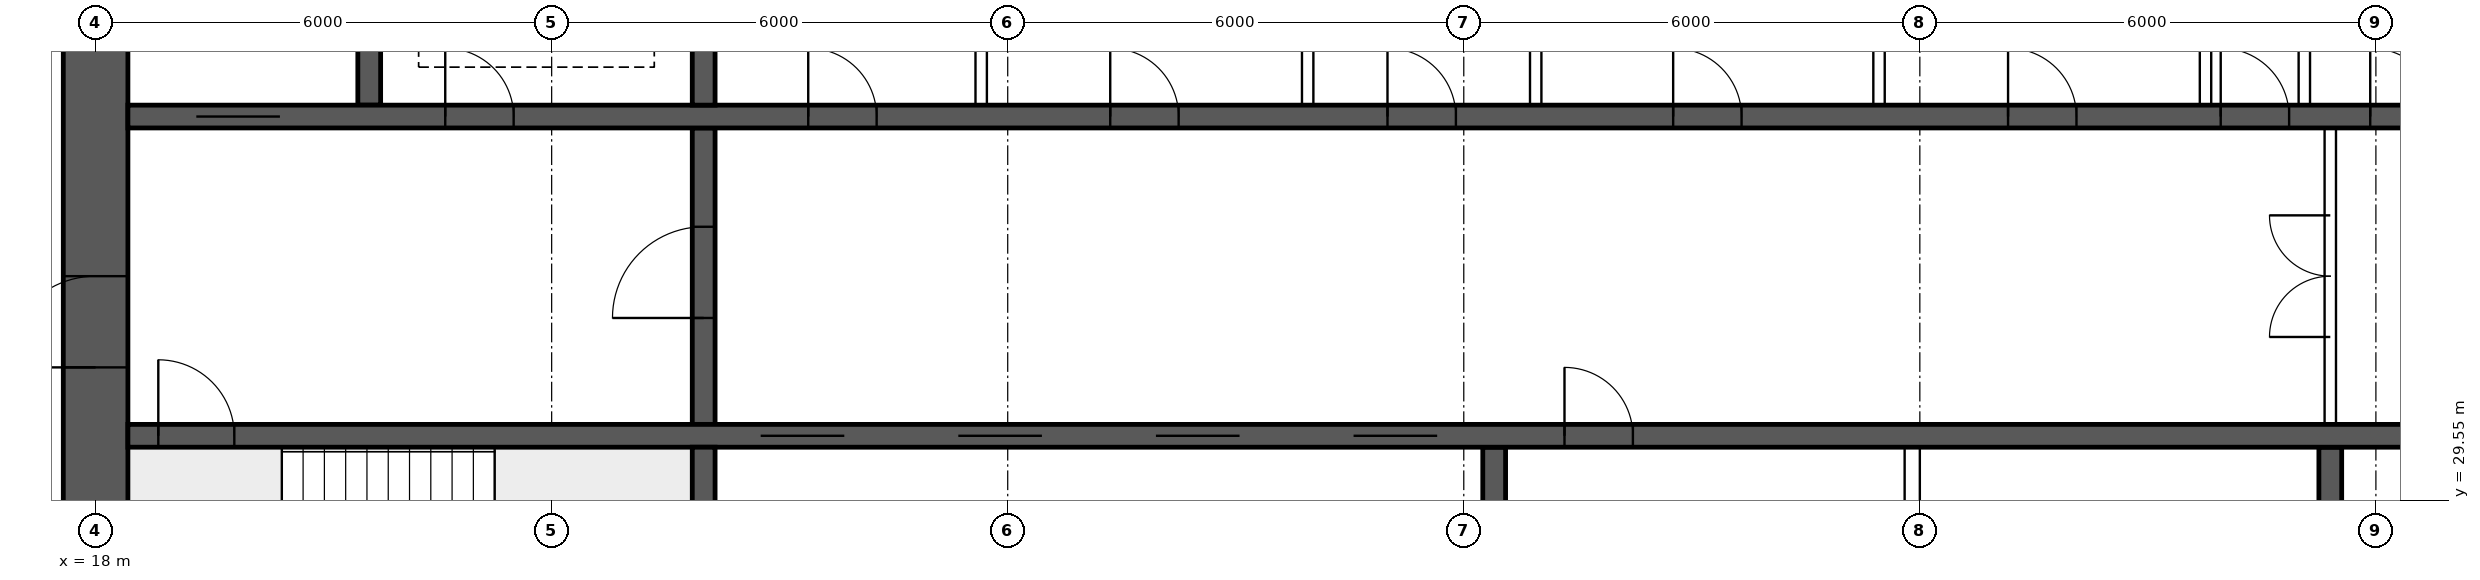
"""IFC4 building model, lengths in metres.
Left out: names, types, materials, properties, quantities, classifications, styles, units other than length and angle.
Written with IfcOpenShell. Run it as: python <this file> out.ifc"""

import sys

from ifc_helpers import new_model, si_unit, direction, frame, frame_2d, origin, place, context, subcontext, project, spatial, rectangle, extrude, element, fill, save


model = new_model("IFC4")
c1 = context("Model", 3, precision=1e-05, world=origin(), true_north=direction((0.0, 1.0)))
c2 = subcontext(c1, "Body", "Model", "MODEL_VIEW")
j1 = project(units=[si_unit("LENGTHUNIT", "METRE"), si_unit("PLANEANGLEUNIT", "RADIAN")], contexts=[c1])
p1 = place(None, origin())
s1 = spatial("IfcSite", under=j1, at=p1, CompositionType="ELEMENT")
p2 = place(p1, origin())
s2 = spatial("IfcBuilding", under=s1, at=p2, CompositionType="ELEMENT")
p3 = place(p2, frame((0.0, 0.0, 171.1)))
s3 = spatial("IfcBuildingStorey", under=s2, at=p3, CompositionType="ELEMENT", Elevation=171.1)
p4 = place(p3, frame((18.0, 26.225, 0.0), z_axis=(0.0, 0.0, 1.0), x_axis=(0.0, 1.0, 0.0)))
e1 = element("IfcWall", 1, at=p4, inside=s3, PredefinedType="SHEAR", context=c2, shape_type="SweptSolid", body=[
    extrude(rectangle(XDim=11.55, YDim=0.85, at=frame_2d((5.775, 0.0))), origin(), (0.0, 0.0, 1.0), 3.75),
])
p5 = place(p4, frame((5.075, 0.0, 0.0)))
e2 = element("IfcOpeningElement", 2, at=p5, cuts=e1, PredefinedType="OPENING", context=c2, shape_type="SweptSolid", body=[
    extrude(rectangle(XDim=1.2, YDim=2.1, at=frame_2d((0.6, 1.05))), frame((0.0, 0.435, 0.0), z_axis=(0.0, -1.0, 0.0), x_axis=(1.0, 0.0, 0.0)), (0.0, 0.0, 1.0), 0.87),
])
p6 = place(p3, frame((18.425, 30.4, 0.0), z_axis=(0.0, 0.0, 1.0), x_axis=(1.0, 0.0, 0.0)))
e3 = element("IfcWall", 3, at=p6, inside=s3, PredefinedType="SHEAR", context=c2, shape_type="SweptSolid", body=[
    extrude(rectangle(XDim=47.15, YDim=0.3, at=frame_2d((23.575, 0.0))), origin(), (0.0, 0.0, 1.0), 3.75),
])
p7 = place(p6, frame((0.4, 0.0, 0.0)))
e4 = element("IfcOpeningElement", 4, at=p7, cuts=e3, PredefinedType="OPENING", context=c2, shape_type="SweptSolid", body=[
    extrude(rectangle(XDim=1.0, YDim=2.1, at=frame_2d((0.5, 1.05))), frame((0.0, 0.16, 0.0), z_axis=(0.0, -1.0, 0.0), x_axis=(1.0, 0.0, 0.0)), (0.0, 0.0, 1.0), 0.32),
])
p8 = place(p6, frame((45.75, 0.0, 0.0)))
e5 = element("IfcOpeningElement", 5, at=p8, cuts=e3, PredefinedType="OPENING", context=c2, shape_type="SweptSolid", body=[
    extrude(rectangle(XDim=1.0, YDim=2.1, at=frame_2d((0.5, 1.05))), frame((0.0, 0.16, 0.0), z_axis=(0.0, -1.0, 0.0), x_axis=(1.0, 0.0, 0.0)), (0.0, 0.0, 1.0), 0.32),
])
p9 = place(p6, frame((8.325, 0.0, 0.0)))
e6 = element("IfcOpeningElement", 6, at=p9, cuts=e3, PredefinedType="OPENING", context=c2, shape_type="SweptSolid", body=[
    extrude(rectangle(XDim=1.1, YDim=2.1, at=frame_2d((0.55, 1.05))), frame((0.0, 0.16, 0.0), z_axis=(0.0, -1.0, 0.0), x_axis=(1.0, 0.0, 0.0)), (0.0, 0.0, 1.0), 0.32),
])
p10 = place(p6, frame((10.925, 0.0, 0.0)))
e7 = element("IfcOpeningElement", 7, at=p10, cuts=e3, PredefinedType="OPENING", context=c2, shape_type="SweptSolid", body=[
    extrude(rectangle(XDim=1.1, YDim=2.1, at=frame_2d((0.55, 1.05))), frame((0.0, 0.16, 0.0), z_axis=(0.0, -1.0, 0.0), x_axis=(1.0, 0.0, 0.0)), (0.0, 0.0, 1.0), 0.32),
])
p11 = place(p6, frame((13.525, 0.0, 0.0)))
e8 = element("IfcOpeningElement", 8, at=p11, cuts=e3, PredefinedType="OPENING", context=c2, shape_type="SweptSolid", body=[
    extrude(rectangle(XDim=1.1, YDim=2.1, at=frame_2d((0.55, 1.05))), frame((0.0, 0.16, 0.0), z_axis=(0.0, -1.0, 0.0), x_axis=(1.0, 0.0, 0.0)), (0.0, 0.0, 1.0), 0.32),
])
p12 = place(p6, frame((16.125, 0.0, 0.0)))
e9 = element("IfcOpeningElement", 9, at=p12, cuts=e3, PredefinedType="OPENING", context=c2, shape_type="SweptSolid", body=[
    extrude(rectangle(XDim=1.1, YDim=2.1, at=frame_2d((0.55, 1.05))), frame((0.0, 0.16, 0.0), z_axis=(0.0, -1.0, 0.0), x_axis=(1.0, 0.0, 0.0)), (0.0, 0.0, 1.0), 0.32),
])
p13 = place(p6, frame((18.9, 0.0, 0.0)))
e10 = element("IfcOpeningElement", 10, at=p13, cuts=e3, PredefinedType="OPENING", context=c2, shape_type="SweptSolid", body=[
    extrude(rectangle(XDim=0.9, YDim=2.1, at=frame_2d((0.45, 1.05))), frame((0.0, 0.16, 0.0), z_axis=(0.0, -1.0, 0.0), x_axis=(1.0, 0.0, 0.0)), (0.0, 0.0, 1.0), 0.32),
])
p14 = place(p6, frame((30.192, 0.0, 0.0)))
e11 = element("IfcOpeningElement", 11, at=p14, cuts=e3, PredefinedType="OPENING", context=c2, shape_type="SweptSolid", body=[
    extrude(rectangle(XDim=1.1, YDim=2.1, at=frame_2d((0.55, 1.05))), frame((0.0, 0.16, 0.0), z_axis=(0.0, -1.0, 0.0), x_axis=(1.0, 0.0, 0.0)), (0.0, 0.0, 1.0), 0.32),
])
p15 = place(p6, frame((33.725, 0.0, 0.0)))
e12 = element("IfcOpeningElement", 12, at=p15, cuts=e3, PredefinedType="OPENING", context=c2, shape_type="SweptSolid", body=[
    extrude(rectangle(XDim=1.1, YDim=2.1, at=frame_2d((0.55, 1.05))), frame((0.0, 0.16, 0.0), z_axis=(0.0, -1.0, 0.0), x_axis=(1.0, 0.0, 0.0)), (0.0, 0.0, 1.0), 0.32),
])
p16 = place(p6, frame((37.258, 0.0, 0.0)))
e13 = element("IfcOpeningElement", 13, at=p16, cuts=e3, PredefinedType="OPENING", context=c2, shape_type="SweptSolid", body=[
    extrude(rectangle(XDim=1.1, YDim=2.1, at=frame_2d((0.55, 1.05))), frame((0.0, 0.16, 0.0), z_axis=(0.0, -1.0, 0.0), x_axis=(1.0, 0.0, 0.0)), (0.0, 0.0, 1.0), 0.32),
])
p17 = place(p3, frame((18.425, 34.6, 0.0), z_axis=(0.0, 0.0, 1.0), x_axis=(1.0, 0.0, 0.0)))
e14 = element("IfcWall", 14, at=p17, inside=s3, PredefinedType="SHEAR", context=c2, shape_type="SweptSolid", body=[
    extrude(rectangle(XDim=47.15, YDim=0.3, at=frame_2d((23.575, 0.0))), origin(), (0.0, 0.0, 1.0), 3.75),
])
p18 = place(p17, frame((0.9, 0.0, 0.0)))
e15 = element("IfcOpeningElement", 15, at=p18, cuts=e14, PredefinedType="OPENING", context=c2, shape_type="SweptSolid", body=[
    extrude(rectangle(XDim=1.1, YDim=2.1, at=frame_2d((0.55, 1.05))), frame((0.0, 0.16, 0.0), z_axis=(0.0, -1.0, 0.0), x_axis=(1.0, 0.0, 0.0)), (0.0, 0.0, 1.0), 0.32),
])
p19 = place(p17, frame((45.15, 0.0, 0.0)))
e16 = element("IfcOpeningElement", 16, at=p19, cuts=e14, PredefinedType="OPENING", context=c2, shape_type="SweptSolid", body=[
    extrude(rectangle(XDim=1.1, YDim=2.1, at=frame_2d((0.55, 1.05))), frame((0.0, 0.16, 0.0), z_axis=(0.0, -1.0, 0.0), x_axis=(1.0, 0.0, 0.0)), (0.0, 0.0, 1.0), 0.32),
])
p20 = place(p17, frame((4.175, 0.0, 0.0)))
e17 = element("IfcOpeningElement", 17, at=p20, cuts=e14, PredefinedType="OPENING", context=c2, shape_type="SweptSolid", body=[
    extrude(rectangle(XDim=0.9, YDim=2.1, at=frame_2d((0.45, 1.05))), frame((0.0, 0.16, 0.0), z_axis=(0.0, -1.0, 0.0), x_axis=(1.0, 0.0, 0.0)), (0.0, 0.0, 1.0), 0.32),
])
p21 = place(p17, frame((42.075, 0.0, 0.0)))
e18 = element("IfcOpeningElement", 18, at=p21, cuts=e14, PredefinedType="OPENING", context=c2, shape_type="SweptSolid", body=[
    extrude(rectangle(XDim=0.9, YDim=2.1, at=frame_2d((0.45, 1.05))), frame((0.0, 0.16, 0.0), z_axis=(0.0, -1.0, 0.0), x_axis=(1.0, 0.0, 0.0)), (0.0, 0.0, 1.0), 0.32),
])
p22 = place(p17, frame((8.95, 0.0, 0.0)))
e19 = element("IfcOpeningElement", 19, at=p22, cuts=e14, PredefinedType="OPENING", context=c2, shape_type="SweptSolid", body=[
    extrude(rectangle(XDim=0.9, YDim=2.1, at=frame_2d((0.45, 1.05))), frame((0.0, 0.16, 0.0), z_axis=(0.0, -1.0, 0.0), x_axis=(1.0, 0.0, 0.0)), (0.0, 0.0, 1.0), 0.32),
])
p23 = place(p17, frame((12.924, 0.0, 0.0)))
e20 = element("IfcOpeningElement", 20, at=p23, cuts=e14, PredefinedType="OPENING", context=c2, shape_type="SweptSolid", body=[
    extrude(rectangle(XDim=0.9, YDim=2.1, at=frame_2d((0.45, 1.05))), frame((0.0, 0.16, 0.0), z_axis=(0.0, -1.0, 0.0), x_axis=(1.0, 0.0, 0.0)), (0.0, 0.0, 1.0), 0.32),
])
p24 = place(p17, frame((16.571, 0.0, 0.0)))
e21 = element("IfcOpeningElement", 21, at=p24, cuts=e14, PredefinedType="OPENING", context=c2, shape_type="SweptSolid", body=[
    extrude(rectangle(XDim=0.9, YDim=2.1, at=frame_2d((0.45, 1.05))), frame((0.0, 0.16, 0.0), z_axis=(0.0, -1.0, 0.0), x_axis=(1.0, 0.0, 0.0)), (0.0, 0.0, 1.0), 0.32),
])
p25 = place(p17, frame((20.33, 0.0, 0.0)))
e22 = element("IfcOpeningElement", 22, at=p25, cuts=e14, PredefinedType="OPENING", context=c2, shape_type="SweptSolid", body=[
    extrude(rectangle(XDim=0.9, YDim=2.1, at=frame_2d((0.45, 1.05))), frame((0.0, 0.16, 0.0), z_axis=(0.0, -1.0, 0.0), x_axis=(1.0, 0.0, 0.0)), (0.0, 0.0, 1.0), 0.32),
])
p26 = place(p17, frame((24.736, 0.0, 0.0)))
e23 = element("IfcOpeningElement", 23, at=p26, cuts=e14, PredefinedType="OPENING", context=c2, shape_type="SweptSolid", body=[
    extrude(rectangle(XDim=0.9, YDim=2.1, at=frame_2d((0.45, 1.05))), frame((0.0, 0.16, 0.0), z_axis=(0.0, -1.0, 0.0), x_axis=(1.0, 0.0, 0.0)), (0.0, 0.0, 1.0), 0.32),
])
p27 = place(p17, frame((27.533, 0.0, 0.0)))
e24 = element("IfcOpeningElement", 24, at=p27, cuts=e14, PredefinedType="OPENING", context=c2, shape_type="SweptSolid", body=[
    extrude(rectangle(XDim=0.9, YDim=2.1, at=frame_2d((0.45, 1.05))), frame((0.0, 0.16, 0.0), z_axis=(0.0, -1.0, 0.0), x_axis=(1.0, 0.0, 0.0)), (0.0, 0.0, 1.0), 0.32),
])
p28 = place(p17, frame((29.5, 0.0, 0.0)))
e25 = element("IfcOpeningElement", 25, at=p28, cuts=e14, PredefinedType="OPENING", context=c2, shape_type="SweptSolid", body=[
    extrude(rectangle(XDim=0.9, YDim=2.1, at=frame_2d((0.45, 1.05))), frame((0.0, 0.16, 0.0), z_axis=(0.0, -1.0, 0.0), x_axis=(1.0, 0.0, 0.0)), (0.0, 0.0, 1.0), 0.32),
])
p29 = place(p17, frame((31.932, 0.0, 0.0)))
e26 = element("IfcOpeningElement", 26, at=p29, cuts=e14, PredefinedType="OPENING", context=c2, shape_type="SweptSolid", body=[
    extrude(rectangle(XDim=0.9, YDim=2.1, at=frame_2d((0.45, 1.05))), frame((0.0, 0.16, 0.0), z_axis=(0.0, -1.0, 0.0), x_axis=(1.0, 0.0, 0.0)), (0.0, 0.0, 1.0), 0.32),
])
p30 = place(p17, frame((34.667, 0.0, 0.0)))
e27 = element("IfcOpeningElement", 27, at=p30, cuts=e14, PredefinedType="OPENING", context=c2, shape_type="SweptSolid", body=[
    extrude(rectangle(XDim=0.9, YDim=2.1, at=frame_2d((0.45, 1.05))), frame((0.0, 0.16, 0.0), z_axis=(0.0, -1.0, 0.0), x_axis=(1.0, 0.0, 0.0)), (0.0, 0.0, 1.0), 0.32),
])
p31 = place(p17, frame((37.707, 0.0, 0.0)))
e28 = element("IfcOpeningElement", 28, at=p31, cuts=e14, PredefinedType="OPENING", context=c2, shape_type="SweptSolid", body=[
    extrude(rectangle(XDim=0.9, YDim=2.1, at=frame_2d((0.45, 1.05))), frame((0.0, 0.16, 0.0), z_axis=(0.0, -1.0, 0.0), x_axis=(1.0, 0.0, 0.0)), (0.0, 0.0, 1.0), 0.32),
])
p32 = place(p3, frame((26.0, 26.225, 0.0), z_axis=(0.0, 0.0, 1.0), x_axis=(0.0, 1.0, 0.0)))
e29 = element("IfcWall", 29, at=p32, inside=s3, PredefinedType="SHEAR", context=c2, shape_type="SweptSolid", body=[
    extrude(rectangle(XDim=4.025, YDim=0.3, at=frame_2d((2.012, 0.0))), origin(), (0.0, 0.0, 1.0), 3.75),
])
p33 = place(p3, frame((26.0, 30.55, 0.0), z_axis=(0.0, 0.0, 1.0), x_axis=(0.0, 1.0, 0.0)))
e30 = element("IfcWall", 30, at=p33, inside=s3, PredefinedType="SHEAR", context=c2, shape_type="SweptSolid", body=[
    extrude(rectangle(XDim=3.9, YDim=0.3, at=frame_2d((1.95, 0.0))), origin(), (0.0, 0.0, 1.0), 3.75),
])
p34 = place(p33, frame((1.4, 0.0, 0.0)))
e31 = element("IfcOpeningElement", 31, at=p34, cuts=e30, PredefinedType="OPENING", context=c2, shape_type="SweptSolid", body=[
    extrude(rectangle(XDim=1.2, YDim=2.1, at=frame_2d((0.6, 1.05))), frame((0.0, 0.16, 0.0), z_axis=(0.0, -1.0, 0.0), x_axis=(1.0, 0.0, 0.0)), (0.0, 0.0, 1.0), 0.32),
])
for number, where, z_axis, x_axis in (
    (32, (21.6, 34.75, 0.0), (0.0, 0.0, 1.0), (0.0, 1.0, 0.0)),
    (33, (26.0, 34.75, 0.0), (0.0, 0.0, 1.0), (0.0, 1.0, 0.0)),
):
    element("IfcWall", number, at=place(p3, frame(where, z_axis=z_axis, x_axis=x_axis)), inside=s3, PredefinedType="SHEAR", context=c2, shape_type="SweptSolid", body=[
        extrude(rectangle(XDim=3.025, YDim=0.3, at=frame_2d((1.512, 0.0))), origin(), (0.0, 0.0, 1.0), 3.75),
    ])
for number, where, z_axis, x_axis in (
    (34, (36.4, 26.225, 0.0), (0.0, 0.0, 1.0), (0.0, 1.0, 0.0)),
    (35, (47.4, 26.225, 0.0), (0.0, 0.0, 1.0), (0.0, 1.0, 0.0)),
):
    element("IfcWall", number, at=place(p3, frame(where, z_axis=z_axis, x_axis=x_axis)), inside=s3, PredefinedType="SHEAR", context=c2, shape_type="SweptSolid", body=[
        extrude(rectangle(XDim=4.025, YDim=0.3, at=frame_2d((2.012, 0.0))), origin(), (0.0, 0.0, 1.0), 3.75),
    ])
p35 = place(p3, frame((47.4, 30.55, 0.0), z_axis=(0.0, 0.0, 1.0), x_axis=(0.0, 1.0, 0.0)))
e36 = element("IfcWall", 36, at=p35, inside=s3, PredefinedType="SOLIDWALL", context=c2, shape_type="SweptSolid", body=[
    extrude(rectangle(XDim=3.9, YDim=0.15, at=frame_2d((1.95, 0.0))), origin(), (0.0, 0.0, 1.0), 3.5),
])
p36 = place(p35, frame((1.15, 0.0, 0.0)))
e37 = element("IfcOpeningElement", 37, at=p36, cuts=e36, PredefinedType="OPENING", context=c2, shape_type="SweptSolid", body=[
    extrude(rectangle(XDim=1.6, YDim=2.1, at=frame_2d((0.8, 1.05))), frame((0.0, 0.085, 0.0), z_axis=(0.0, -1.0, 0.0), x_axis=(1.0, 0.0, 0.0)), (0.0, 0.0, 1.0), 0.17),
])
for number, where, z_axis, x_axis in (
    (38, (29.651, 34.75, 0.0), (0.0, 0.0, 1.0), (0.0, 1.0, 0.0)),
    (39, (33.946, 34.75, 0.0), (0.0, 0.0, 1.0), (0.0, 1.0, 0.0)),
    (40, (36.946, 34.75, 0.0), (0.0, 0.0, 1.0), (0.0, 1.0, 0.0)),
    (41, (41.463, 34.75, 0.0), (0.0, 0.0, 1.0), (0.0, 1.0, 0.0)),
    (42, (45.758, 34.75, 0.0), (0.0, 0.0, 1.0), (0.0, 1.0, 0.0)),
    (43, (47.058, 34.75, 0.0), (0.0, 0.0, 1.0), (0.0, 1.0, 0.0)),
):
    element("IfcWall", number, at=place(p3, frame(where, z_axis=z_axis, x_axis=x_axis)), inside=s3, PredefinedType="SOLIDWALL", context=c2, shape_type="SweptSolid", body=[
        extrude(rectangle(XDim=3.025, YDim=0.15, at=frame_2d((1.512, 0.0))), origin(), (0.0, 0.0, 1.0), 3.5),
    ])
p37 = place(p3, frame((41.9, 26.225, 0.0), z_axis=(0.0, 0.0, 1.0), x_axis=(0.0, 1.0, 0.0)))
e44 = element("IfcWall", 44, at=p37, inside=s3, PredefinedType="SOLIDWALL", context=c2, shape_type="SweptSolid", body=[
    extrude(rectangle(XDim=4.025, YDim=0.2, at=frame_2d((2.012, 0.0))), origin(), (0.0, 0.0, 1.0), 3.5),
])
p38 = place(p36, origin())
e45 = element("IfcDoor", 45, at=p38, inside=s3, OperationType="DOUBLE_DOOR_SINGLE_SWING", PredefinedType="DOOR", context=c2, shape_type="SweptSolid", body=[
    extrude(rectangle(XDim=1.6, YDim=2.1, at=frame_2d((0.8, 1.05))), frame((0.0, 0.025, 0.0), z_axis=(0.0, -1.0, 0.0), x_axis=(1.0, 0.0, 0.0)), (0.0, 0.0, 1.0), 0.05),
])
fill(e37, e45)
p39 = place(p5, origin())
e46 = element("IfcDoor", 46, at=p39, inside=s3, OperationType="SINGLE_SWING_LEFT", PredefinedType="DOOR", context=c2, shape_type="SweptSolid", body=[
    extrude(rectangle(XDim=1.2, YDim=2.1, at=frame_2d((0.6, 1.05))), frame((0.0, 0.025, 0.0), z_axis=(0.0, -1.0, 0.0), x_axis=(1.0, 0.0, 0.0)), (0.0, 0.0, 1.0), 0.05),
])
fill(e2, e46)
p40 = place(p7, origin())
e47 = element("IfcDoor", 47, at=p40, inside=s3, OperationType="SINGLE_SWING_LEFT", PredefinedType="DOOR", context=c2, shape_type="SweptSolid", body=[
    extrude(rectangle(XDim=1.0, YDim=2.1, at=frame_2d((0.5, 1.05))), frame((0.0, 0.025, 0.0), z_axis=(0.0, -1.0, 0.0), x_axis=(1.0, 0.0, 0.0)), (0.0, 0.0, 1.0), 0.05),
])
fill(e4, e47)
p41 = place(p18, origin())
e48 = element("IfcDoor", 48, at=p41, inside=s3, OperationType="DOUBLE_DOOR_SLIDING", PredefinedType="DOOR", context=c2, shape_type="SweptSolid", body=[
    extrude(rectangle(XDim=1.1, YDim=2.1, at=frame_2d((0.55, 1.05))), frame((0.0, 0.025, 0.0), z_axis=(0.0, -1.0, 0.0), x_axis=(1.0, 0.0, 0.0)), (0.0, 0.0, 1.0), 0.05),
])
fill(e15, e48)
p42 = place(p20, origin())
e49 = element("IfcDoor", 49, at=p42, inside=s3, OperationType="SINGLE_SWING_LEFT", PredefinedType="DOOR", context=c2, shape_type="SweptSolid", body=[
    extrude(rectangle(XDim=0.9, YDim=2.1, at=frame_2d((0.45, 1.05))), frame((0.0, 0.025, 0.0), z_axis=(0.0, -1.0, 0.0), x_axis=(1.0, 0.0, 0.0)), (0.0, 0.0, 1.0), 0.05),
])
fill(e17, e49)
p43 = place(p34, origin())
e50 = element("IfcDoor", 50, at=p43, inside=s3, OperationType="SINGLE_SWING_LEFT", PredefinedType="DOOR", context=c2, shape_type="SweptSolid", body=[
    extrude(rectangle(XDim=1.2, YDim=2.1, at=frame_2d((0.6, 1.05))), frame((0.0, 0.025, 0.0), z_axis=(0.0, -1.0, 0.0), x_axis=(1.0, 0.0, 0.0)), (0.0, 0.0, 1.0), 0.05),
])
fill(e31, e50)
p44 = place(p22, origin())
e51 = element("IfcDoor", 51, at=p44, inside=s3, OperationType="SINGLE_SWING_LEFT", PredefinedType="DOOR", context=c2, shape_type="SweptSolid", body=[
    extrude(rectangle(XDim=0.9, YDim=2.1, at=frame_2d((0.45, 1.05))), frame((0.0, 0.025, 0.0), z_axis=(0.0, -1.0, 0.0), x_axis=(1.0, 0.0, 0.0)), (0.0, 0.0, 1.0), 0.05),
])
fill(e19, e51)
p45 = place(p23, origin())
e52 = element("IfcDoor", 52, at=p45, inside=s3, OperationType="SINGLE_SWING_LEFT", PredefinedType="DOOR", context=c2, shape_type="SweptSolid", body=[
    extrude(rectangle(XDim=0.9, YDim=2.1, at=frame_2d((0.45, 1.05))), frame((0.0, 0.025, 0.0), z_axis=(0.0, -1.0, 0.0), x_axis=(1.0, 0.0, 0.0)), (0.0, 0.0, 1.0), 0.05),
])
fill(e20, e52)
p46 = place(p24, origin())
e53 = element("IfcDoor", 53, at=p46, inside=s3, OperationType="SINGLE_SWING_LEFT", PredefinedType="DOOR", context=c2, shape_type="SweptSolid", body=[
    extrude(rectangle(XDim=0.9, YDim=2.1, at=frame_2d((0.45, 1.05))), frame((0.0, 0.025, 0.0), z_axis=(0.0, -1.0, 0.0), x_axis=(1.0, 0.0, 0.0)), (0.0, 0.0, 1.0), 0.05),
])
fill(e21, e53)
p47 = place(p25, origin())
e54 = element("IfcDoor", 54, at=p47, inside=s3, OperationType="SINGLE_SWING_LEFT", PredefinedType="DOOR", context=c2, shape_type="SweptSolid", body=[
    extrude(rectangle(XDim=0.9, YDim=2.1, at=frame_2d((0.45, 1.05))), frame((0.0, 0.025, 0.0), z_axis=(0.0, -1.0, 0.0), x_axis=(1.0, 0.0, 0.0)), (0.0, 0.0, 1.0), 0.05),
])
fill(e22, e54)
p48 = place(p26, origin())
e55 = element("IfcDoor", 55, at=p48, inside=s3, OperationType="SINGLE_SWING_LEFT", PredefinedType="DOOR", context=c2, shape_type="SweptSolid", body=[
    extrude(rectangle(XDim=0.9, YDim=2.1, at=frame_2d((0.45, 1.05))), frame((0.0, 0.025, 0.0), z_axis=(0.0, -1.0, 0.0), x_axis=(1.0, 0.0, 0.0)), (0.0, 0.0, 1.0), 0.05),
])
fill(e23, e55)
p49 = place(p27, origin())
e56 = element("IfcDoor", 56, at=p49, inside=s3, OperationType="SINGLE_SWING_LEFT", PredefinedType="DOOR", context=c2, shape_type="SweptSolid", body=[
    extrude(rectangle(XDim=0.9, YDim=2.1, at=frame_2d((0.45, 1.05))), frame((0.0, 0.025, 0.0), z_axis=(0.0, -1.0, 0.0), x_axis=(1.0, 0.0, 0.0)), (0.0, 0.0, 1.0), 0.05),
])
fill(e24, e56)
p50 = place(p28, origin())
e57 = element("IfcDoor", 57, at=p50, inside=s3, OperationType="SINGLE_SWING_LEFT", PredefinedType="DOOR", context=c2, shape_type="SweptSolid", body=[
    extrude(rectangle(XDim=0.9, YDim=2.1, at=frame_2d((0.45, 1.05))), frame((0.0, 0.025, 0.0), z_axis=(0.0, -1.0, 0.0), x_axis=(1.0, 0.0, 0.0)), (0.0, 0.0, 1.0), 0.05),
])
fill(e25, e57)
p51 = place(p9, origin())
e58 = element("IfcDoor", 58, at=p51, inside=s3, OperationType="DOUBLE_DOOR_SLIDING", PredefinedType="DOOR", context=c2, shape_type="SweptSolid", body=[
    extrude(rectangle(XDim=1.1, YDim=2.1, at=frame_2d((0.55, 1.05))), frame((0.0, 0.025, 0.0), z_axis=(0.0, -1.0, 0.0), x_axis=(1.0, 0.0, 0.0)), (0.0, 0.0, 1.0), 0.05),
])
fill(e6, e58)
p52 = place(p10, origin())
e59 = element("IfcDoor", 59, at=p52, inside=s3, OperationType="DOUBLE_DOOR_SLIDING", PredefinedType="DOOR", context=c2, shape_type="SweptSolid", body=[
    extrude(rectangle(XDim=1.1, YDim=2.1, at=frame_2d((0.55, 1.05))), frame((0.0, 0.025, 0.0), z_axis=(0.0, -1.0, 0.0), x_axis=(1.0, 0.0, 0.0)), (0.0, 0.0, 1.0), 0.05),
])
fill(e7, e59)
p53 = place(p11, origin())
e60 = element("IfcDoor", 60, at=p53, inside=s3, OperationType="DOUBLE_DOOR_SLIDING", PredefinedType="DOOR", context=c2, shape_type="SweptSolid", body=[
    extrude(rectangle(XDim=1.1, YDim=2.1, at=frame_2d((0.55, 1.05))), frame((0.0, 0.025, 0.0), z_axis=(0.0, -1.0, 0.0), x_axis=(1.0, 0.0, 0.0)), (0.0, 0.0, 1.0), 0.05),
])
fill(e8, e60)
p54 = place(p12, origin())
e61 = element("IfcDoor", 61, at=p54, inside=s3, OperationType="DOUBLE_DOOR_SLIDING", PredefinedType="DOOR", context=c2, shape_type="SweptSolid", body=[
    extrude(rectangle(XDim=1.1, YDim=2.1, at=frame_2d((0.55, 1.05))), frame((0.0, 0.025, 0.0), z_axis=(0.0, -1.0, 0.0), x_axis=(1.0, 0.0, 0.0)), (0.0, 0.0, 1.0), 0.05),
])
fill(e9, e61)
p55 = place(p13, origin())
e62 = element("IfcDoor", 62, at=p55, inside=s3, OperationType="SINGLE_SWING_LEFT", PredefinedType="DOOR", context=c2, shape_type="SweptSolid", body=[
    extrude(rectangle(XDim=0.9, YDim=2.1, at=frame_2d((0.45, 1.05))), frame((0.0, 0.025, 0.0), z_axis=(0.0, -1.0, 0.0), x_axis=(1.0, 0.0, 0.0)), (0.0, 0.0, 1.0), 0.05),
])
fill(e10, e62)
save(model, sys.argv[1])
